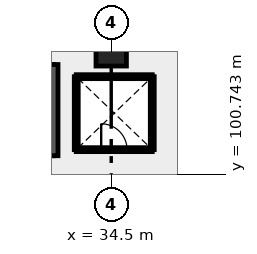
"""IFC4 building model, lengths in metres.
Left out: names, types, materials, properties, quantities, classifications, styles, units other than length and angle.
Written with IfcOpenShell. Run it as: python <this file> out.ifc"""

import sys

from ifc_helpers import new_model, si_unit, direction, frame, frame_2d, origin, origin_2d, place, context, subcontext, project, spatial, rectangle, extrude, element, fill, save


model = new_model("IFC4")
c1 = context("Model", 3, precision=1e-05, world=origin(), true_north=direction((0.0, 1.0)))
c2 = subcontext(c1, "Body", "Model", "MODEL_VIEW")
j1 = project(units=[si_unit("LENGTHUNIT", "METRE"), si_unit("PLANEANGLEUNIT", "RADIAN")], contexts=[c1])
p1 = place(None, origin())
s1 = spatial("IfcSite", under=j1, at=p1, CompositionType="ELEMENT")
p2 = place(p1, origin())
s2 = spatial("IfcBuilding", under=s1, at=p2, CompositionType="ELEMENT")
p3 = place(p2, origin())
s3 = spatial("IfcBuildingStorey", under=s2, at=p3, CompositionType="ELEMENT", Elevation=0.0)
p4 = place(p3, frame((34.5, 104.8, 0.0), z_axis=(0.0, 0.0, 1.0), x_axis=(1.0, 0.0, 0.0)))
e1 = element("IfcColumn", 1, at=p4, inside=s3, PredefinedType="COLUMN", context=c2, shape_type="SweptSolid", body=[
    extrude(rectangle(XDim=1.0, YDim=1.0, at=origin_2d()), origin(), (0.0, 0.0, 1.0), 4.2),
])
p5 = place(p3, frame((30.7, 101.5, 0.0), z_axis=(0.0, 0.0, 1.0), x_axis=(1.0, 0.0, 0.0)))
e2 = element("IfcWall", 2, at=p5, inside=s3, PredefinedType="SHEAR", context=c2, shape_type="SweptSolid", body=[
    extrude(rectangle(XDim=1.9, YDim=0.3, at=frame_2d((0.95, 0.0))), origin(), (0.0, 0.0, 1.0), 4.2),
])
p6 = place(p5, frame((0.4, 0.0, 0.0)))
e3 = element("IfcOpeningElement", 3, at=p6, cuts=e2, PredefinedType="OPENING", context=c2, shape_type="SweptSolid", body=[
    extrude(rectangle(XDim=1.1, YDim=2.15, at=frame_2d((0.55, 1.075))), frame((0.0, 0.16, 0.0), z_axis=(0.0, -1.0, 0.0), x_axis=(1.0, 0.0, 0.0)), (0.0, 0.0, 1.0), 0.32),
])
p7 = place(p3, frame((30.7, 104.2, 0.0), z_axis=(0.0, 0.0, 1.0), x_axis=(1.0, 0.0, 0.0)))
e4 = element("IfcWall", 4, at=p7, inside=s3, PredefinedType="SHEAR", context=c2, shape_type="SweptSolid", body=[
    extrude(rectangle(XDim=1.9, YDim=0.3, at=frame_2d((0.95, 0.0))), origin(), (0.0, 0.0, 1.0), 4.2),
])
p8 = place(p3, frame((32.6, 101.35, 0.0), z_axis=(0.0, 0.0, 1.0), x_axis=(0.0, 1.0, 0.0)))
e5 = element("IfcWall", 5, at=p8, inside=s3, PredefinedType="SHEAR", context=c2, shape_type="SweptSolid", body=[
    extrude(rectangle(XDim=3.0, YDim=0.3, at=frame_2d((1.5, 0.0))), origin(), (0.0, 0.0, 1.0), 4.2),
])
p9 = place(p3, frame((33.35, 101.55, 0.0), z_axis=(0.0, 0.0, 1.0), x_axis=(1.0, 0.0, 0.0)))
e6 = element("IfcWall", 6, at=p9, inside=s3, PredefinedType="PLUMBINGWALL", context=c2, shape_type="SweptSolid", body=[
    extrude(rectangle(XDim=2.5, YDim=0.13, at=frame_2d((1.25, 0.0))), origin(), (0.0, 0.0, 1.0), 3.88),
])
p10 = place(p9, frame((0.82, 0.0, 0.0)))
e7 = element("IfcOpeningElement", 7, at=p10, cuts=e6, PredefinedType="OPENING", context=c2, shape_type="SweptSolid", body=[
    extrude(rectangle(XDim=0.85, YDim=2.0, at=frame_2d((0.425, 1.0))), frame((0.0, 0.075, 0.0), z_axis=(0.0, -1.0, 0.0), x_axis=(1.0, 0.0, 0.0)), (0.0, 0.0, 1.0), 0.15),
])
for number, where, z_axis, x_axis in (
    (8, (33.35, 101.55, 0.0), (0.0, 0.0, 1.0), (0.0, 1.0, 0.0)),
    (9, (35.85, 101.55, 0.0), (0.0, 0.0, 1.0), (0.0, 1.0, 0.0)),
):
    element("IfcWall", number, at=place(p3, frame(where, z_axis=z_axis, x_axis=x_axis)), inside=s3, PredefinedType="PLUMBINGWALL", context=c2, shape_type="SweptSolid", body=[
        extrude(rectangle(XDim=2.4, YDim=0.13, at=frame_2d((1.2, 0.0))), origin(), (0.0, 0.0, 1.0), 3.88),
    ])
p11 = place(p3, frame((33.35, 103.95, 0.0), z_axis=(0.0, 0.0, 1.0), x_axis=(1.0, 0.0, 0.0)))
e10 = element("IfcWall", 10, at=p11, inside=s3, PredefinedType="PLUMBINGWALL", context=c2, shape_type="SweptSolid", body=[
    extrude(rectangle(XDim=2.5, YDim=0.13, at=frame_2d((1.25, 0.0))), origin(), (0.0, 0.0, 1.0), 3.88),
])
p12 = place(p10, origin())
e11 = element("IfcDoor", 11, at=p12, inside=s3, OperationType="SINGLE_SWING_LEFT", PredefinedType="TRAPDOOR", context=c2, shape_type="SweptSolid", body=[
    extrude(rectangle(XDim=0.85, YDim=2.0, at=frame_2d((0.425, 1.0))), frame((0.0, 0.025, 0.0), z_axis=(0.0, -1.0, 0.0), x_axis=(1.0, 0.0, 0.0)), (0.0, 0.0, 1.0), 0.05),
])
fill(e7, e11)
save(model, sys.argv[1])
